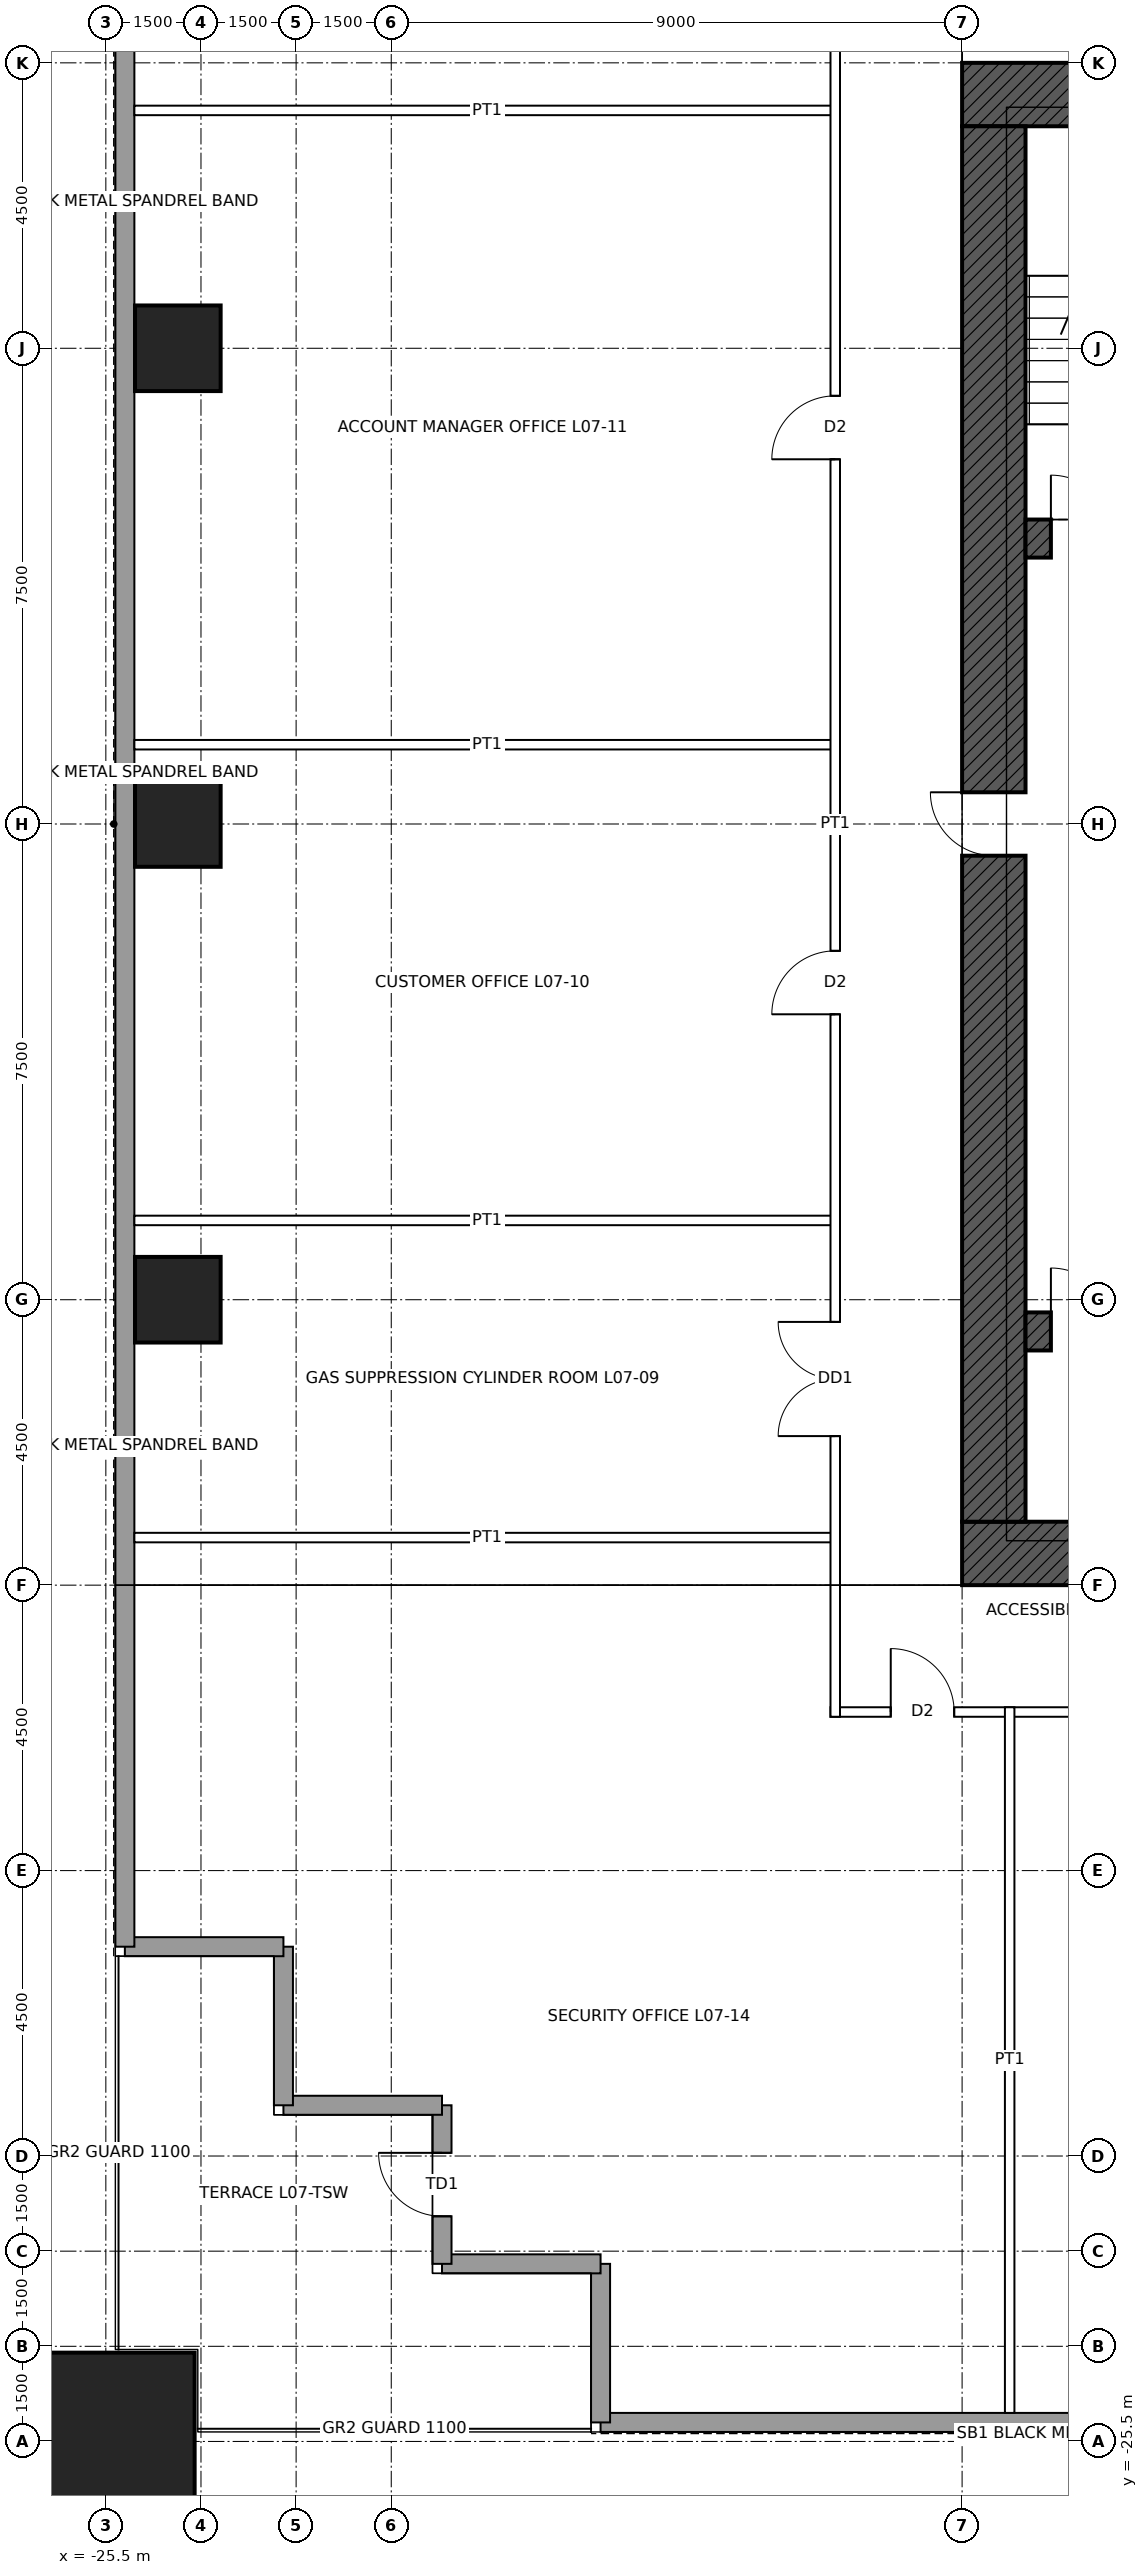
"""IFC4 building model, lengths in metres.
Left out: names, types, materials, properties, quantities, classifications, styles, units other than length and angle.
Written with IfcOpenShell. Run it as: python <this file> out.ifc"""

import sys

from ifc_helpers import new_model, si_unit, direction, frame, frame_2d, origin, origin_2d, place, context, subcontext, project, spatial, rectangle, hollow_rectangle, extrude, element, fill, save


model = new_model("IFC4")
c1 = context("Model", 3, precision=1e-05, world=origin(), true_north=direction((0.0, 1.0)))
c2 = subcontext(c1, "Body", "Model", "MODEL_VIEW")
j1 = project(units=[si_unit("LENGTHUNIT", "METRE"), si_unit("PLANEANGLEUNIT", "RADIAN")], contexts=[c1])
p1 = place(None, origin())
s1 = spatial("IfcSite", under=j1, at=p1, CompositionType="ELEMENT")
p2 = place(p1, origin())
s2 = spatial("IfcBuilding", under=s1, at=p2, CompositionType="ELEMENT")
p3 = place(p2, frame((0.0, 0.0, 38.4)))
s3 = spatial("IfcBuildingStorey", under=s2, at=p3, CompositionType="ELEMENT", Elevation=38.4)
p4 = place(p3, frame((-25.5, -25.5, 0.0), z_axis=(0.0, 0.0, 1.0), x_axis=(1.0, 0.0, 0.0)))
e1 = element("IfcColumn", 1, at=p4, inside=s3, PredefinedType="COLUMN", context=c2, shape_type="SweptSolid", body=[
    extrude(hollow_rectangle(XDim=2.8, YDim=2.8, WallThickness=0.14, at=origin_2d()), origin(), (0.0, 0.0, 1.0), 5.0),
])
for number, where, z_axis, x_axis in (
    (2, (-24.365, -7.5, 0.0), (0.0, 0.0, 1.0), (1.0, 0.0, 0.0)),
    (3, (-24.365, 0.0, 0.0), (0.0, 0.0, 1.0), (1.0, 0.0, 0.0)),
    (4, (-24.365, 7.5, 0.0), (0.0, 0.0, 1.0), (1.0, 0.0, 0.0)),
):
    element("IfcColumn", number, at=place(p3, frame(where, z_axis=z_axis, x_axis=x_axis)), inside=s3, PredefinedType="COLUMN", context=c2, shape_type="SweptSolid", body=[
        extrude(hollow_rectangle(XDim=1.35, YDim=1.35, WallThickness=0.085, at=origin_2d()), origin(), (0.0, 0.0, 1.0), 5.0),
    ])
p5 = place(p3, frame((-12.0, 11.5, 0.0), z_axis=(0.0, 0.0, 1.0), x_axis=(1.0, 0.0, 0.0)))
e5 = element("IfcWall", 5, at=p5, inside=s3, PredefinedType="SHEAR", context=c2, shape_type="SweptSolid", body=[
    extrude(rectangle(XDim=24.0, YDim=1.0, at=frame_2d((12.0, 0.0))), origin(), (0.0, 0.0, 1.0), 5.0),
])
p6 = place(p5, frame((6.25, 0.0, 0.0)))
e6 = element("IfcOpeningElement", 6, at=p6, cuts=e5, PredefinedType="OPENING", context=c2, shape_type="SweptSolid", body=[
    extrude(rectangle(XDim=1.0, YDim=2.4, at=frame_2d((0.5, 1.2))), frame((0.0, 0.51, 0.0), z_axis=(0.0, -1.0, 0.0), x_axis=(1.0, 0.0, 0.0)), (0.0, 0.0, 1.0), 1.02),
])
p7 = place(p5, frame((16.75, 0.0, 0.0)))
e7 = element("IfcOpeningElement", 7, at=p7, cuts=e5, PredefinedType="OPENING", context=c2, shape_type="SweptSolid", body=[
    extrude(rectangle(XDim=1.0, YDim=2.4, at=frame_2d((0.5, 1.2))), frame((0.0, 0.51, 0.0), z_axis=(0.0, -1.0, 0.0), x_axis=(1.0, 0.0, 0.0)), (0.0, 0.0, 1.0), 1.02),
])
p8 = place(p3, frame((12.0, -11.5, 0.0), z_axis=(0.0, 0.0, 1.0), x_axis=(-1.0, 0.0, 0.0)))
e8 = element("IfcWall", 8, at=p8, inside=s3, PredefinedType="SHEAR", context=c2, shape_type="SweptSolid", body=[
    extrude(rectangle(XDim=24.0, YDim=1.0, at=frame_2d((12.0, 0.0))), origin(), (0.0, 0.0, 1.0), 5.0),
])
p9 = place(p8, frame((11.5, 0.0, 0.0)))
e9 = element("IfcOpeningElement", 9, at=p9, cuts=e8, PredefinedType="OPENING", context=c2, shape_type="SweptSolid", body=[
    extrude(rectangle(XDim=1.0, YDim=2.1, at=frame_2d((0.5, 1.05))), frame((0.0, 0.51, 0.0), z_axis=(0.0, -1.0, 0.0), x_axis=(1.0, 0.0, 0.0)), (0.0, 0.0, 1.0), 1.02),
])
p10 = place(p8, frame((1.0, 0.0, 0.0)))
e10 = element("IfcOpeningElement", 10, at=p10, cuts=e8, PredefinedType="OPENING", context=c2, shape_type="SweptSolid", body=[
    extrude(rectangle(XDim=1.0, YDim=2.4, at=frame_2d((0.5, 1.2))), frame((0.0, 0.51, 0.0), z_axis=(0.0, -1.0, 0.0), x_axis=(1.0, 0.0, 0.0)), (0.0, 0.0, 1.0), 1.02),
])
p11 = place(p3, frame((-11.5, -11.0, 0.0), z_axis=(0.0, 0.0, 1.0), x_axis=(0.0, 1.0, 0.0)))
e11 = element("IfcWall", 11, at=p11, inside=s3, PredefinedType="SHEAR", context=c2, shape_type="SweptSolid", body=[
    extrude(rectangle(XDim=22.0, YDim=1.0, at=frame_2d((11.0, 0.0))), origin(), (0.0, 0.0, 1.0), 5.0),
])
p12 = place(p11, frame((10.5, 0.0, 0.0)))
e12 = element("IfcOpeningElement", 12, at=p12, cuts=e11, PredefinedType="OPENING", context=c2, shape_type="SweptSolid", body=[
    extrude(rectangle(XDim=1.0, YDim=2.4, at=frame_2d((0.5, 1.2))), frame((0.0, 0.51, 0.0), z_axis=(0.0, -1.0, 0.0), x_axis=(1.0, 0.0, 0.0)), (0.0, 0.0, 1.0), 1.02),
])
p13 = place(p3, frame((-11.0, 4.5, 0.0), z_axis=(0.0, 0.0, 1.0), x_axis=(1.0, 0.0, 0.0)))
e13 = element("IfcWall", 13, at=p13, inside=s3, PredefinedType="SHEAR", context=c2, shape_type="SweptSolid", body=[
    extrude(rectangle(XDim=22.0, YDim=0.6, at=frame_2d((11.0, 0.0))), origin(), (0.0, 0.0, 1.0), 5.0),
])
p14 = place(p13, frame((0.4, 0.0, 0.0)))
e14 = element("IfcOpeningElement", 14, at=p14, cuts=e13, PredefinedType="OPENING", context=c2, shape_type="SweptSolid", body=[
    extrude(rectangle(XDim=1.0, YDim=2.1, at=frame_2d((0.5, 1.05))), frame((0.0, 0.31, 0.0), z_axis=(0.0, -1.0, 0.0), x_axis=(1.0, 0.0, 0.0)), (0.0, 0.0, 1.0), 0.62),
])
p15 = place(p13, frame((20.6, 0.0, 0.0)))
e15 = element("IfcOpeningElement", 15, at=p15, cuts=e13, PredefinedType="OPENING", context=c2, shape_type="SweptSolid", body=[
    extrude(rectangle(XDim=1.0, YDim=2.1, at=frame_2d((0.5, 1.05))), frame((0.0, 0.31, 0.0), z_axis=(0.0, -1.0, 0.0), x_axis=(1.0, 0.0, 0.0)), (0.0, 0.0, 1.0), 0.62),
])
p16 = place(p3, frame((-11.0, -8.0, 0.0), z_axis=(0.0, 0.0, 1.0), x_axis=(1.0, 0.0, 0.0)))
e16 = element("IfcWall", 16, at=p16, inside=s3, PredefinedType="SHEAR", context=c2, shape_type="SweptSolid", body=[
    extrude(rectangle(XDim=2.0, YDim=0.6, at=frame_2d((1.0, 0.0))), origin(), (0.0, 0.0, 1.0), 5.0),
])
p17 = place(p16, frame((0.4, 0.0, 0.0)))
e17 = element("IfcOpeningElement", 17, at=p17, cuts=e16, PredefinedType="OPENING", context=c2, shape_type="SweptSolid", body=[
    extrude(rectangle(XDim=1.0, YDim=2.1, at=frame_2d((0.5, 1.05))), frame((0.0, 0.31, 0.0), z_axis=(0.0, -1.0, 0.0), x_axis=(1.0, 0.0, 0.0)), (0.0, 0.0, 1.0), 0.62),
])
p18 = place(p3, frame((17.7, -25.2, 0.0), z_axis=(0.0, 0.0, 1.0), x_axis=(-1.0, 0.0, 0.0)))
e18 = element("IfcWall", 18, at=p18, inside=s3, PredefinedType="SOLIDWALL", context=c2, shape_type="SweptSolid", body=[
    extrude(rectangle(XDim=35.4, YDim=0.3, at=frame_2d((17.7, 0.0))), origin(), (0.0, 0.0, 1.0), 4.8),
])
for number, where, z_axis, x_axis in (
    (19, (-17.7, -25.2, 0.0), (0.0, 0.0, 1.0), (0.0, 1.0, 0.0)),
    (20, (-17.7, -22.7, 0.0), (0.0, 0.0, 1.0), (-1.0, 0.0, 0.0)),
):
    element("IfcWall", number, at=place(p3, frame(where, z_axis=z_axis, x_axis=x_axis)), inside=s3, PredefinedType="SOLIDWALL", context=c2, shape_type="SweptSolid", body=[
        extrude(rectangle(XDim=2.5, YDim=0.3, at=frame_2d((1.25, 0.0))), origin(), (0.0, 0.0, 1.0), 4.8),
    ])
p19 = place(p3, frame((-20.2, -22.7, 0.0), z_axis=(0.0, 0.0, 1.0), x_axis=(0.0, 1.0, 0.0)))
e21 = element("IfcWall", 21, at=p19, inside=s3, PredefinedType="SOLIDWALL", context=c2, shape_type="SweptSolid", body=[
    extrude(rectangle(XDim=2.5, YDim=0.3, at=frame_2d((1.25, 0.0))), origin(), (0.0, 0.0, 1.0), 4.8),
])
p20 = place(p19, frame((0.75, 0.0, 0.0)))
e22 = element("IfcOpeningElement", 22, at=p20, cuts=e21, PredefinedType="OPENING", context=c2, shape_type="SweptSolid", body=[
    extrude(rectangle(XDim=1.0, YDim=2.4, at=frame_2d((0.5, 1.2))), frame((0.0, 0.16, 0.0), z_axis=(0.0, -1.0, 0.0), x_axis=(1.0, 0.0, 0.0)), (0.0, 0.0, 1.0), 0.32),
])
for number, where, z_axis, x_axis in (
    (23, (-20.2, -20.2, 0.0), (0.0, 0.0, 1.0), (-1.0, 0.0, 0.0)),
    (24, (-22.7, -20.2, 0.0), (0.0, 0.0, 1.0), (0.0, 1.0, 0.0)),
    (25, (-22.7, -17.7, 0.0), (0.0, 0.0, 1.0), (-1.0, 0.0, 0.0)),
):
    element("IfcWall", number, at=place(p3, frame(where, z_axis=z_axis, x_axis=x_axis)), inside=s3, PredefinedType="SOLIDWALL", context=c2, shape_type="SweptSolid", body=[
        extrude(rectangle(XDim=2.5, YDim=0.3, at=frame_2d((1.25, 0.0))), origin(), (0.0, 0.0, 1.0), 4.8),
    ])
p21 = place(p3, frame((-25.2, -17.7, 0.0), z_axis=(0.0, 0.0, 1.0), x_axis=(0.0, 1.0, 0.0)))
e26 = element("IfcWall", 26, at=p21, inside=s3, PredefinedType="SOLIDWALL", context=c2, shape_type="SweptSolid", body=[
    extrude(rectangle(XDim=35.4, YDim=0.3, at=frame_2d((17.7, 0.0))), origin(), (0.0, 0.0, 1.0), 4.8),
])
p22 = place(p3, frame((-14.075, -14.0, 0.0), z_axis=(0.0, 0.0, 1.0), x_axis=(1.0, 0.0, 0.0)))
e27 = element("IfcWall", 27, at=p22, inside=s3, PredefinedType="PARTITIONING", context=c2, shape_type="SweptSolid", body=[
    extrude(rectangle(XDim=28.15, YDim=0.15, at=frame_2d((14.075, 0.0))), origin(), (0.0, 0.0, 1.0), 4.8),
])
p23 = place(p22, frame((21.925, 0.0, 0.0)))
e28 = element("IfcOpeningElement", 28, at=p23, cuts=e27, PredefinedType="OPENING", context=c2, shape_type="SweptSolid", body=[
    extrude(rectangle(XDim=1.8, YDim=2.4, at=frame_2d((0.9, 1.2))), frame((0.0, 0.085, 0.0), z_axis=(0.0, -1.0, 0.0), x_axis=(1.0, 0.0, 0.0)), (0.0, 0.0, 1.0), 0.17),
])
p24 = place(p22, frame((15.675, 0.0, 0.0)))
e29 = element("IfcOpeningElement", 29, at=p24, cuts=e27, PredefinedType="OPENING", context=c2, shape_type="SweptSolid", body=[
    extrude(rectangle(XDim=1.8, YDim=2.4, at=frame_2d((0.9, 1.2))), frame((0.0, 0.085, 0.0), z_axis=(0.0, -1.0, 0.0), x_axis=(1.0, 0.0, 0.0)), (0.0, 0.0, 1.0), 0.17),
])
p25 = place(p22, frame((7.325, 0.0, 0.0)))
e30 = element("IfcOpeningElement", 30, at=p25, cuts=e27, PredefinedType="OPENING", context=c2, shape_type="SweptSolid", body=[
    extrude(rectangle(XDim=1.0, YDim=2.1, at=frame_2d((0.5, 1.05))), frame((0.0, 0.085, 0.0), z_axis=(0.0, -1.0, 0.0), x_axis=(1.0, 0.0, 0.0)), (0.0, 0.0, 1.0), 0.17),
])
p26 = place(p22, frame((26.2, 0.0, 0.0)))
e31 = element("IfcOpeningElement", 31, at=p26, cuts=e27, PredefinedType="OPENING", context=c2, shape_type="SweptSolid", body=[
    extrude(rectangle(XDim=1.0, YDim=2.1, at=frame_2d((0.5, 1.05))), frame((0.0, 0.085, 0.0), z_axis=(0.0, -1.0, 0.0), x_axis=(1.0, 0.0, 0.0)), (0.0, 0.0, 1.0), 0.17),
])
p27 = place(p22, frame((0.95, 0.0, 0.0)))
e32 = element("IfcOpeningElement", 32, at=p27, cuts=e27, PredefinedType="OPENING", context=c2, shape_type="SweptSolid", body=[
    extrude(rectangle(XDim=1.0, YDim=2.1, at=frame_2d((0.5, 1.05))), frame((0.0, 0.085, 0.0), z_axis=(0.0, -1.0, 0.0), x_axis=(1.0, 0.0, 0.0)), (0.0, 0.0, 1.0), 0.17),
])
p28 = place(p3, frame((-25.05, -11.25, 0.0), z_axis=(0.0, 0.0, 1.0), x_axis=(1.0, 0.0, 0.0)))
e33 = element("IfcWall", 33, at=p28, inside=s3, PredefinedType="PARTITIONING", context=c2, shape_type="SweptSolid", body=[
    extrude(rectangle(XDim=11.125, YDim=0.15, at=frame_2d((5.562, 0.0))), origin(), (0.0, 0.0, 1.0), 3.853),
])
for number, where, z_axis, x_axis in (
    (34, (-25.05, -6.25, 0.0), (0.0, 0.0, 1.0), (1.0, 0.0, 0.0)),
    (35, (-25.05, 1.25, 0.0), (0.0, 0.0, 1.0), (1.0, 0.0, 0.0)),
):
    element("IfcWall", number, at=place(p3, frame(where, z_axis=z_axis, x_axis=x_axis)), inside=s3, PredefinedType="PARTITIONING", context=c2, shape_type="SweptSolid", body=[
        extrude(rectangle(XDim=11.125, YDim=0.15, at=frame_2d((5.562, 0.0))), origin(), (0.0, 0.0, 1.0), 4.8),
    ])
p29 = place(p3, frame((-25.05, 11.25, 0.0), z_axis=(0.0, 0.0, 1.0), x_axis=(1.0, 0.0, 0.0)))
e36 = element("IfcWall", 36, at=p29, inside=s3, PredefinedType="PARTITIONING", context=c2, shape_type="SweptSolid", body=[
    extrude(rectangle(XDim=11.125, YDim=0.15, at=frame_2d((5.562, 0.0))), origin(), (0.0, 0.0, 1.0), 3.853),
])
p30 = place(p3, frame((-14.0, -14.075, 0.0), z_axis=(0.0, 0.0, 1.0), x_axis=(0.0, 1.0, 0.0)))
e37 = element("IfcWall", 37, at=p30, inside=s3, PredefinedType="PARTITIONING", context=c2, shape_type="SweptSolid", body=[
    extrude(rectangle(XDim=28.15, YDim=0.15, at=frame_2d((14.075, 0.0))), origin(), (0.0, 0.0, 1.0), 4.8),
])
p31 = place(p30, frame((4.425, 0.0, 0.0)))
e38 = element("IfcOpeningElement", 38, at=p31, cuts=e37, PredefinedType="OPENING", context=c2, shape_type="SweptSolid", body=[
    extrude(rectangle(XDim=1.8, YDim=2.4, at=frame_2d((0.9, 1.2))), frame((0.0, 0.085, 0.0), z_axis=(0.0, -1.0, 0.0), x_axis=(1.0, 0.0, 0.0)), (0.0, 0.0, 1.0), 0.17),
])
p32 = place(p30, frame((11.075, 0.0, 0.0)))
e39 = element("IfcOpeningElement", 39, at=p32, cuts=e37, PredefinedType="OPENING", context=c2, shape_type="SweptSolid", body=[
    extrude(rectangle(XDim=1.0, YDim=2.1, at=frame_2d((0.5, 1.05))), frame((0.0, 0.085, 0.0), z_axis=(0.0, -1.0, 0.0), x_axis=(1.0, 0.0, 0.0)), (0.0, 0.0, 1.0), 0.17),
])
p33 = place(p30, frame((19.825, 0.0, 0.0)))
e40 = element("IfcOpeningElement", 40, at=p33, cuts=e37, PredefinedType="OPENING", context=c2, shape_type="SweptSolid", body=[
    extrude(rectangle(XDim=1.0, YDim=2.1, at=frame_2d((0.5, 1.05))), frame((0.0, 0.085, 0.0), z_axis=(0.0, -1.0, 0.0), x_axis=(1.0, 0.0, 0.0)), (0.0, 0.0, 1.0), 0.17),
])
p34 = place(p3, frame((-11.25, -25.05, 0.0), z_axis=(0.0, 0.0, 1.0), x_axis=(0.0, 1.0, 0.0)))
e41 = element("IfcWall", 41, at=p34, inside=s3, PredefinedType="PARTITIONING", context=c2, shape_type="SweptSolid", body=[
    extrude(rectangle(XDim=11.125, YDim=0.15, at=frame_2d((5.562, 0.0))), origin(), (0.0, 0.0, 1.0), 3.853),
])
p35 = place(p20, origin())
e42 = element("IfcDoor", 42, at=p35, inside=s3, OperationType="SINGLE_SWING_RIGHT", PredefinedType="DOOR", context=c2, shape_type="SweptSolid", body=[
    extrude(rectangle(XDim=1.0, YDim=2.4, at=frame_2d((0.5, 1.2))), frame((0.0, 0.025, 0.0), z_axis=(0.0, -1.0, 0.0), x_axis=(1.0, 0.0, 0.0)), (0.0, 0.0, 1.0), 0.05),
])
fill(e22, e42)
p36 = place(p14, origin())
e43 = element("IfcDoor", 43, at=p36, inside=s3, OperationType="SINGLE_SWING_LEFT", PredefinedType="DOOR", context=c2, shape_type="SweptSolid", body=[
    extrude(rectangle(XDim=1.0, YDim=2.1, at=frame_2d((0.5, 1.05))), frame((0.0, 0.025, 0.0), z_axis=(0.0, -1.0, 0.0), x_axis=(1.0, 0.0, 0.0)), (0.0, 0.0, 1.0), 0.05),
])
fill(e14, e43)
p37 = place(p12, origin())
e44 = element("IfcDoor", 44, at=p37, inside=s3, OperationType="SINGLE_SWING_RIGHT", PredefinedType="DOOR", context=c2, shape_type="SweptSolid", body=[
    extrude(rectangle(XDim=1.0, YDim=2.4, at=frame_2d((0.5, 1.2))), frame((0.0, 0.485, 0.0), z_axis=(0.0, -1.0, 0.0), x_axis=(1.0, 0.0, 0.0)), (0.0, 0.0, 1.0), 0.05),
])
fill(e12, e44)
p38 = place(p17, origin())
e45 = element("IfcDoor", 45, at=p38, inside=s3, OperationType="SINGLE_SWING_LEFT", PredefinedType="DOOR", context=c2, shape_type="SweptSolid", body=[
    extrude(rectangle(XDim=1.0, YDim=2.1, at=frame_2d((0.5, 1.05))), frame((0.0, 0.025, 0.0), z_axis=(0.0, -1.0, 0.0), x_axis=(1.0, 0.0, 0.0)), (0.0, 0.0, 1.0), 0.05),
])
fill(e17, e45)
p39 = place(p31, origin())
e46 = element("IfcDoor", 46, at=p39, inside=s3, OperationType="DOUBLE_DOOR_SINGLE_SWING", PredefinedType="DOOR", context=c2, shape_type="SweptSolid", body=[
    extrude(rectangle(XDim=1.8, YDim=2.4, at=frame_2d((0.9, 1.2))), frame((0.0, 0.025, 0.0), z_axis=(0.0, -1.0, 0.0), x_axis=(1.0, 0.0, 0.0)), (0.0, 0.0, 1.0), 0.05),
])
fill(e38, e46)
p40 = place(p32, origin())
e47 = element("IfcDoor", 47, at=p40, inside=s3, OperationType="SINGLE_SWING_LEFT", PredefinedType="DOOR", context=c2, shape_type="SweptSolid", body=[
    extrude(rectangle(XDim=1.0, YDim=2.1, at=frame_2d((0.5, 1.05))), frame((0.0, 0.025, 0.0), z_axis=(0.0, -1.0, 0.0), x_axis=(1.0, 0.0, 0.0)), (0.0, 0.0, 1.0), 0.05),
])
fill(e39, e47)
p41 = place(p33, origin())
e48 = element("IfcDoor", 48, at=p41, inside=s3, OperationType="SINGLE_SWING_LEFT", PredefinedType="DOOR", context=c2, shape_type="SweptSolid", body=[
    extrude(rectangle(XDim=1.0, YDim=2.1, at=frame_2d((0.5, 1.05))), frame((0.0, 0.025, 0.0), z_axis=(0.0, -1.0, 0.0), x_axis=(1.0, 0.0, 0.0)), (0.0, 0.0, 1.0), 0.05),
])
fill(e40, e48)
p42 = place(p27, origin())
e49 = element("IfcDoor", 49, at=p42, inside=s3, OperationType="SINGLE_SWING_LEFT", PredefinedType="DOOR", context=c2, shape_type="SweptSolid", body=[
    extrude(rectangle(XDim=1.0, YDim=2.1, at=frame_2d((0.5, 1.05))), frame((0.0, 0.025, 0.0), z_axis=(0.0, -1.0, 0.0), x_axis=(1.0, 0.0, 0.0)), (0.0, 0.0, 1.0), 0.05),
])
fill(e32, e49)
save(model, sys.argv[1])
